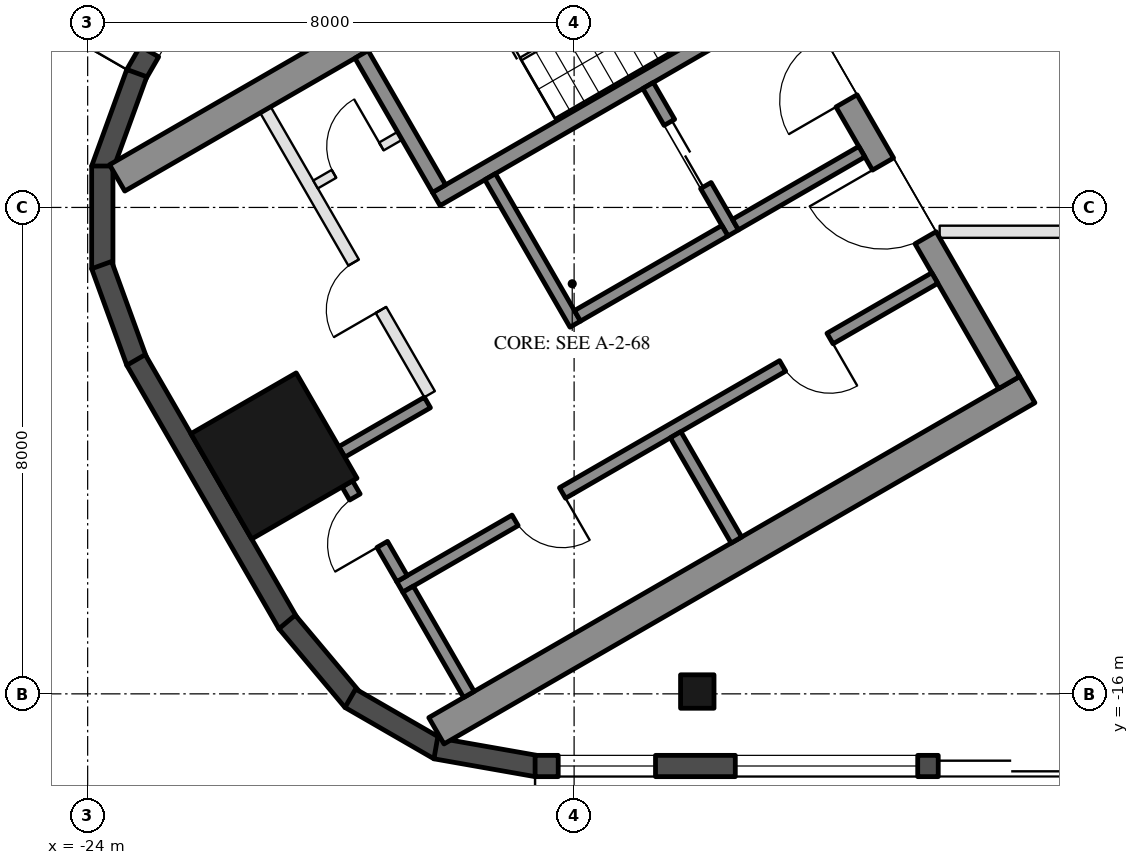
"""IFC4 building model, lengths in metres.
Left out: names, types, materials, properties, quantities, classifications, styles, units other than length and angle.
Written with IfcOpenShell. Run it as: python <this file> out.ifc"""

import sys

from ifc_helpers import new_model, si_unit, direction, frame, frame_2d, origin, origin_2d, place, context, subcontext, project, spatial, rectangle, hollow_rectangle, extrude, boolean, halfspace, element, fill, save


model = new_model("IFC4")
c1 = context("Model", 3, precision=1e-05, world=origin(), true_north=direction((0.0, 1.0)))
c2 = subcontext(c1, "Body", "Model", "MODEL_VIEW")
j1 = project(units=[si_unit("LENGTHUNIT", "METRE"), si_unit("PLANEANGLEUNIT", "RADIAN")], contexts=[c1])
p1 = place(None, origin())
s1 = spatial("IfcSite", under=j1, at=p1, CompositionType="ELEMENT")
p2 = place(p1, origin())
s2 = spatial("IfcBuilding", under=s1, at=p2, CompositionType="ELEMENT")
p3 = place(p2, frame((0.0, 0.0, 294.8)))
s3 = spatial("IfcBuildingStorey", under=s2, at=p3, CompositionType="ELEMENT", Elevation=294.8)
p4 = place(p3, frame((-13.974, -15.962, 0.0), z_axis=(0.0, 0.0, 1.0), x_axis=(-1.0, 0.0, 0.0)))
e1 = element("IfcColumn", 1, at=p4, inside=s3, PredefinedType="COLUMN", context=c2, shape_type="SweptSolid", body=[
    boolean("DIFFERENCE", extrude(hollow_rectangle(XDim=0.55, YDim=0.55, WallThickness=0.025, at=origin_2d()), origin(), (0.0, 0.0, 1.0), 3.7), halfspace(frame((0.0, 0.0, 3.66), z_axis=(0.0, 0.0, 1.0), x_axis=(1.0, 0.0, 0.0)), False)),
])
p5 = place(p3, frame((-20.936, -12.087, 0.0), z_axis=(0.0, 0.0, 1.0), x_axis=(-0.5, 0.866025403784, 0.0)))
e2 = element("IfcColumn", 2, at=p5, inside=s3, PredefinedType="COLUMN", context=c2, shape_type="SweptSolid", body=[
    boolean("DIFFERENCE", extrude(hollow_rectangle(XDim=2.0, YDim=2.0, WallThickness=0.05, at=origin_2d()), origin(), (0.0, 0.0, 1.0), 3.7), halfspace(frame((0.0, 0.0, 3.587), z_axis=(0.0, 0.0, 1.0), x_axis=(1.0, 0.0, 0.0)), False)),
])
p6 = place(p3, frame((-21.421, -2.729, 0.0), z_axis=(0.0, 0.0, 1.0), x_axis=(-0.500040399856, -0.86600207766, 0.0)))
e3 = element("IfcWall", 3, at=p6, inside=s3, PredefinedType="SOLIDWALL", context=c2, shape_type="SweptSolid", body=[
    extrude(rectangle(XDim=3.567, YDim=0.35, at=frame_2d((1.784, 0.0))), origin(), (0.0, 0.0, 1.0), 3.55),
])
p7 = place(p6, frame((1.525, 0.0, 0.3)))
e4 = element("IfcOpeningElement", 4, at=p7, cuts=e3, PredefinedType="OPENING", context=c2, shape_type="SweptSolid", body=[
    extrude(rectangle(XDim=1.6, YDim=2.65, at=frame_2d((0.8, 1.325))), frame((0.0, 0.185, 0.0), z_axis=(0.0, -1.0, 0.0), x_axis=(1.0, 0.0, 0.0)), (0.0, 0.0, 1.0), 0.37),
])
for number, where, z_axis, x_axis in (
    (5, (-23.192, -5.791, 0.0), (0.0, 0.0, 1.0), (-0.342, -0.94, 0.0)),
    (6, (-23.759, -7.319, 0.0), (0.0, 0.0, 1.0), (0.0, -1.0, 0.0)),
    (7, (-23.77, -8.948, 0.0), (0.0, 0.0, 1.0), (0.342, -0.94, 0.0)),
):
    element("IfcWall", number, at=place(p3, frame(where, z_axis=z_axis, x_axis=x_axis)), inside=s3, PredefinedType="SOLIDWALL", context=c2, shape_type="SweptSolid", body=[
        extrude(rectangle(XDim=1.689, YDim=0.35, at=frame_2d((0.845, 0.0))), origin(), (0.0, 0.0, 1.0), 3.55),
    ])
p8 = place(p3, frame((-23.205, -10.508, 0.0), z_axis=(0.0, 0.0, 1.0), x_axis=(0.500016662025, -0.866015783746, 0.0)))
e8 = element("IfcWall", 8, at=p8, inside=s3, PredefinedType="SOLIDWALL", context=c2, shape_type="SweptSolid", body=[
    extrude(rectangle(XDim=5.004, YDim=0.35, at=frame_2d((2.502, 0.0))), origin(), (0.0, 0.0, 1.0), 3.55),
])
p9 = place(p3, frame((-20.72, -14.817, 0.0), z_axis=(0.0, 0.0, 1.0), x_axis=(0.642697100627, -0.766120380127, 0.0)))
e9 = element("IfcWall", 9, at=p9, inside=s3, PredefinedType="SOLIDWALL", context=c2, shape_type="SweptSolid", body=[
    extrude(rectangle(XDim=1.689, YDim=0.35, at=frame_2d((0.845, 0.0))), origin(), (0.0, 0.0, 1.0), 3.55),
])
for number, where, z_axis, x_axis in (
    (10, (-19.681, -16.072, 0.0), (0.0, 0.0, 1.0), (0.866, -0.5, 0.0)),
    (11, (-18.275, -16.896, 0.0), (0.0, 0.0, 1.0), (0.985, -0.174, 0.0)),
):
    element("IfcWall", number, at=place(p3, frame(where, z_axis=z_axis, x_axis=x_axis)), inside=s3, PredefinedType="SOLIDWALL", context=c2, shape_type="SweptSolid", body=[
        extrude(rectangle(XDim=1.689, YDim=0.35, at=frame_2d((0.845, 0.0))), origin(), (0.0, 0.0, 1.0), 3.55),
    ])
p10 = place(p3, frame((-16.642, -17.187, 0.0), z_axis=(0.0, 0.0, 1.0), x_axis=(1.0, 0.0, 0.0)))
e12 = element("IfcWall", 12, at=p10, inside=s3, PredefinedType="SOLIDWALL", context=c2, shape_type="SweptSolid", body=[
    extrude(rectangle(XDim=10.554, YDim=0.35, at=frame_2d((5.277, 0.0))), origin(), (0.0, 0.0, 1.0), 3.55),
])
p11 = place(p10, frame((0.38, 0.0, 0.3)))
e13 = element("IfcOpeningElement", 13, at=p11, cuts=e12, PredefinedType="OPENING", context=c2, shape_type="SweptSolid", body=[
    extrude(rectangle(XDim=1.6, YDim=2.65, at=frame_2d((0.8, 1.325))), frame((0.0, 0.185, 0.0), z_axis=(0.0, -1.0, 0.0), x_axis=(1.0, 0.0, 0.0)), (0.0, 0.0, 1.0), 0.37),
])
p12 = place(p10, frame((6.63, 0.0, 0.0)))
e14 = element("IfcOpeningElement", 14, at=p12, cuts=e12, PredefinedType="OPENING", context=c2, shape_type="SweptSolid", body=[
    extrude(rectangle(XDim=2.4, YDim=2.4, at=frame_2d((1.2, 1.2))), frame((0.0, 0.185, 0.0), z_axis=(0.0, -1.0, 0.0), x_axis=(1.0, 0.0, 0.0)), (0.0, 0.0, 1.0), 0.37),
])
p13 = place(p10, frame((3.292, 0.0, 0.3)))
e15 = element("IfcOpeningElement", 15, at=p13, cuts=e12, PredefinedType="OPENING", context=c2, shape_type="SweptSolid", body=[
    extrude(rectangle(XDim=3.0, YDim=2.65, at=frame_2d((1.5, 1.325))), frame((0.0, 0.185, 0.0), z_axis=(0.0, -1.0, 0.0), x_axis=(1.0, 0.0, 0.0)), (0.0, 0.0, 1.0), 0.37),
])
for number, where, z_axis, x_axis in (
    (16, (-13.797, -1.903, 0.0), (0.0, 0.0, 1.0), (-0.866, -0.5, 0.0)),
    (17, (-8.547, -10.997, 0.0), (0.0, 0.0, 1.0), (-0.866, -0.5, 0.0)),
):
    element("IfcWall", number, at=place(p3, frame(where, z_axis=z_axis, x_axis=x_axis)), inside=s3, PredefinedType="SHEAR", context=c2, shape_type="SweptSolid", body=[
        extrude(rectangle(XDim=11.222, YDim=0.5, at=frame_2d((5.611, 0.0))), origin(), (0.0, 0.0, 1.0), 3.5),
    ])
p14 = place(p3, frame((-13.845, -2.22, 0.0), z_axis=(0.0, 0.0, 1.0), x_axis=(0.500004234368, -0.866022959057, 0.0)))
e18 = element("IfcWall", 18, at=p14, inside=s3, PredefinedType="SHEAR", context=c2, shape_type="SweptSolid", body=[
    extrude(rectangle(XDim=10.0, YDim=0.4, at=frame_2d((5.0, 0.0))), origin(), (0.0, 0.0, 1.0), 3.5),
])
p15 = place(p14, frame((3.55, 0.0, 0.0)))
e19 = element("IfcOpeningElement", 19, at=p15, cuts=e18, PredefinedType="OPENING", context=c2, shape_type="SweptSolid", body=[
    extrude(rectangle(XDim=1.1, YDim=2.1, at=frame_2d((0.55, 1.05))), frame((0.0, 0.21, 0.0), z_axis=(0.0, -1.0, 0.0), x_axis=(1.0, 0.0, 0.0)), (0.0, 0.0, 1.0), 0.42),
])
p16 = place(p14, frame((5.85, 0.0, 0.0)))
e20 = element("IfcOpeningElement", 20, at=p16, cuts=e18, PredefinedType="OPENING", context=c2, shape_type="SweptSolid", body=[
    extrude(rectangle(XDim=1.4, YDim=2.1, at=frame_2d((0.7, 1.05))), frame((0.0, 0.21, 0.0), z_axis=(0.0, -1.0, 0.0), x_axis=(1.0, 0.0, 0.0)), (0.0, 0.0, 1.0), 0.42),
])
p17 = place(p3, frame((-12.681, -4.636, 0.0), z_axis=(0.0, 0.0, 1.0), x_axis=(-0.866021702275, -0.500006411147, 0.0)))
e21 = element("IfcWall", 21, at=p17, inside=s3, PredefinedType="SHEAR", context=c2, shape_type="SweptSolid", body=[
    extrude(rectangle(XDim=6.45, YDim=0.25, at=frame_2d((3.225, 0.0))), origin(), (0.0, 0.0, 1.0), 3.5),
])
p18 = place(p17, frame((0.3, 0.0, 0.0)))
e22 = element("IfcOpeningElement", 22, at=p18, cuts=e21, PredefinedType="OPENING", context=c2, shape_type="SweptSolid", body=[
    extrude(rectangle(XDim=1.0, YDim=2.1, at=frame_2d((0.5, 1.05))), frame((0.0, 0.135, 0.0), z_axis=(0.0, -1.0, 0.0), x_axis=(1.0, 0.0, 0.0)), (0.0, 0.0, 1.0), 0.27),
])
p19 = place(p3, frame((-19.496, -5.482, 0.0), z_axis=(0.0, 0.0, 1.0), x_axis=(0.499990435942, -0.866030925526, 0.0)))
e23 = element("IfcWall", 23, at=p19, inside=s3, PredefinedType="SHEAR", context=c2, shape_type="SweptSolid", body=[
    extrude(rectangle(XDim=2.55, YDim=0.25, at=frame_2d((1.275, 0.0))), origin(), (0.0, 0.0, 1.0), 3.5),
])
p20 = place(p3, frame((-17.381, -7.495, 0.0), z_axis=(0.0, 0.0, 1.0), x_axis=(0.500011755427, -0.866018616679, 0.0)))
e24 = element("IfcWall", 24, at=p20, inside=s3, PredefinedType="SHEAR", context=c2, shape_type="SweptSolid", body=[
    extrude(rectangle(XDim=2.8, YDim=0.2, at=frame_2d((1.4, 0.0))), origin(), (0.0, 0.0, 1.0), 3.5),
])
p21 = place(p3, frame((-14.783, -5.995, 0.0), z_axis=(0.0, 0.0, 1.0), x_axis=(0.49994636267, -0.866056369097, 0.0)))
e25 = element("IfcWall", 25, at=p21, inside=s3, PredefinedType="SHEAR", context=c2, shape_type="SweptSolid", body=[
    extrude(rectangle(XDim=2.8, YDim=0.2, at=frame_2d((1.4, 0.0))), origin(), (0.0, 0.0, 1.0), 3.5),
])
p22 = place(p21, frame((0.7, 0.0, 0.0)))
e26 = element("IfcOpeningElement", 26, at=p22, cuts=e25, PredefinedType="OPENING", context=c2, shape_type="SweptSolid", body=[
    extrude(rectangle(XDim=1.2, YDim=2.1, at=frame_2d((0.6, 1.05))), frame((0.0, 0.11, 0.0), z_axis=(0.0, -1.0, 0.0), x_axis=(1.0, 0.0, 0.0)), (0.0, 0.0, 1.0), 0.22),
])
p23 = place(p3, frame((-13.52, -8.383, 0.0), z_axis=(0.0, 0.0, 1.0), x_axis=(-0.866034573852, -0.49998411664, 0.0)))
e27 = element("IfcWall", 27, at=p23, inside=s3, PredefinedType="SHEAR", context=c2, shape_type="SweptSolid", body=[
    extrude(rectangle(XDim=2.8, YDim=0.2, at=frame_2d((1.4, 0.0))), origin(), (0.0, 0.0, 1.0), 3.5),
])
p24 = place(p3, frame((-11.268, -7.083, 0.0), z_axis=(0.0, 0.0, 1.0), x_axis=(-0.866050077142, -0.499957262057, 0.0)))
e28 = element("IfcWall", 28, at=p24, inside=s3, PredefinedType="SHEAR", context=c2, shape_type="SweptSolid", body=[
    extrude(rectangle(XDim=2.4, YDim=0.2, at=frame_2d((1.2, 0.0))), origin(), (0.0, 0.0, 1.0), 3.5),
])
p25 = place(p3, frame((-10.068, -9.162, 0.0), z_axis=(0.0, 0.0, 1.0), x_axis=(-0.866032725843, -0.499987317609, 0.0)))
e29 = element("IfcWall", 29, at=p25, inside=s3, PredefinedType="SHEAR", context=c2, shape_type="SweptSolid", body=[
    extrude(rectangle(XDim=10.16, YDim=0.2, at=frame_2d((5.08, 0.0))), origin(), (0.0, 0.0, 1.0), 3.5),
])
p26 = place(p25, frame((1.99, 0.0, 0.0)))
e30 = element("IfcOpeningElement", 30, at=p26, cuts=e29, PredefinedType="OPENING", context=c2, shape_type="SweptSolid", body=[
    extrude(rectangle(XDim=0.9, YDim=2.1, at=frame_2d((0.45, 1.05))), frame((0.0, 0.11, 0.0), z_axis=(0.0, -1.0, 0.0), x_axis=(1.0, 0.0, 0.0)), (0.0, 0.0, 1.0), 0.22),
])
p27 = place(p25, frame((7.07, 0.0, 0.0)))
e31 = element("IfcOpeningElement", 31, at=p27, cuts=e29, PredefinedType="OPENING", context=c2, shape_type="SweptSolid", body=[
    extrude(rectangle(XDim=0.9, YDim=2.1, at=frame_2d((0.45, 1.05))), frame((0.0, 0.11, 0.0), z_axis=(0.0, -1.0, 0.0), x_axis=(1.0, 0.0, 0.0)), (0.0, 0.0, 1.0), 0.22),
])
p28 = place(p3, frame((-19.73, -12.546, 0.0), z_axis=(0.0, 0.0, 1.0), x_axis=(0.500004188491, -0.866022985545, 0.0)))
e32 = element("IfcWall", 32, at=p28, inside=s3, PredefinedType="SHEAR", context=c2, shape_type="SweptSolid", body=[
    extrude(rectangle(XDim=1.8, YDim=0.2, at=frame_2d((0.9, 0.0))), origin(), (0.0, 0.0, 1.0), 3.5),
])
p29 = place(p28, frame((0.25, 0.0, 0.0)))
e33 = element("IfcOpeningElement", 33, at=p29, cuts=e32, PredefinedType="OPENING", context=c2, shape_type="SweptSolid", body=[
    extrude(rectangle(XDim=0.9, YDim=2.1, at=frame_2d((0.45, 1.05))), frame((0.0, 0.11, 0.0), z_axis=(0.0, -1.0, 0.0), x_axis=(1.0, 0.0, 0.0)), (0.0, 0.0, 1.0), 0.22),
])
p30 = place(p3, frame((-18.413, -11.208, 0.0), z_axis=(0.0, 0.0, 1.0), x_axis=(-0.866053003207, -0.499952193351, 0.0)))
e34 = element("IfcWall", 34, at=p30, inside=s3, PredefinedType="SHEAR", context=c2, shape_type="SweptSolid", body=[
    extrude(rectangle(XDim=1.625, YDim=0.2, at=frame_2d((0.812, 0.0))), origin(), (0.0, 0.0, 1.0), 3.5),
])
for number, where, z_axis, x_axis in (
    (35, (-14.331, -11.738, 0.0), (0.0, 0.0, 1.0), (0.5, -0.866, 0.0)),
    (36, (-18.73, -14.278, 0.0), (0.0, 0.0, 1.0), (0.5, -0.866, 0.0)),
):
    element("IfcWall", number, at=place(p3, frame(where, z_axis=z_axis, x_axis=x_axis)), inside=s3, PredefinedType="SHEAR", context=c2, shape_type="SweptSolid", body=[
        extrude(rectangle(XDim=2.0, YDim=0.2, at=frame_2d((1.0, 0.0))), origin(), (0.0, 0.0, 1.0), 3.5),
    ])
p31 = place(p3, frame((-21.076, -6.395, 0.0), z_axis=(0.0, 0.0, 1.0), x_axis=(0.50001468107, -0.866016927499, 0.0)))
e37 = element("IfcWall", 37, at=p31, inside=s3, PredefinedType="PARTITIONING", context=c2, shape_type="SweptSolid", body=[
    extrude(rectangle(XDim=5.4, YDim=0.2, at=frame_2d((2.7, 0.0))), origin(), (0.0, 0.0, 1.0), 3.5),
])
p32 = place(p31, frame((2.9, 0.0, 0.0)))
e38 = element("IfcOpeningElement", 38, at=p32, cuts=e37, PredefinedType="OPENING", context=c2, shape_type="SweptSolid", body=[
    extrude(rectangle(XDim=0.9, YDim=2.1, at=frame_2d((0.45, 1.05))), frame((0.0, 0.11, 0.0), z_axis=(0.0, -1.0, 0.0), x_axis=(1.0, 0.0, 0.0)), (0.0, 0.0, 1.0), 0.22),
])
p33 = place(p3, frame((-18.866, -6.822, 0.0), z_axis=(0.0, 0.0, 1.0), x_axis=(-0.866028054938, -0.499995408039, 0.0)))
e39 = element("IfcWall", 39, at=p33, inside=s3, PredefinedType="PARTITIONING", context=c2, shape_type="SweptSolid", body=[
    extrude(rectangle(XDim=1.6, YDim=0.15, at=frame_2d((0.8, 0.0))), origin(), (0.0, 0.0, 1.0), 3.5),
])
p34 = place(p33, frame((0.35, 0.0, 0.0)))
e40 = element("IfcOpeningElement", 40, at=p34, cuts=e39, PredefinedType="OPENING", context=c2, shape_type="SweptSolid", body=[
    extrude(rectangle(XDim=0.9, YDim=2.1, at=frame_2d((0.45, 1.05))), frame((0.0, 0.085, 0.0), z_axis=(0.0, -1.0, 0.0), x_axis=(1.0, 0.0, 0.0)), (0.0, 0.0, 1.0), 0.17),
])
p35 = place(p3, frame((-3.588, -8.4, 0.0), z_axis=(0.0, 0.0, 1.0), x_axis=(-1.0, 0.0, 0.0)))
e41 = element("IfcWall", 41, at=p35, inside=s3, PredefinedType="PARTITIONING", context=c2, shape_type="SweptSolid", body=[
    extrude(rectangle(XDim=6.4, YDim=0.2, at=frame_2d((3.2, 0.0))), origin(), (0.0, 0.0, 1.0), 3.05),
])
p36 = place(p35, frame((2.957, 0.0, 0.0)))
e42 = element("IfcOpeningElement", 42, at=p36, cuts=e41, PredefinedType="OPENING", context=c2, shape_type="SweptSolid", body=[
    extrude(rectangle(XDim=1.0, YDim=2.1, at=frame_2d((0.5, 1.05))), frame((0.0, 0.11, 0.0), z_axis=(0.0, -1.0, 0.0), x_axis=(1.0, 0.0, 0.0)), (0.0, 0.0, 1.0), 0.22),
])
p37 = place(p11, origin())
e43 = element("IfcWindow", 43, at=p37, inside=s3, PartitioningType="SINGLE_PANEL", PredefinedType="WINDOW", context=c2, shape_type="SweptSolid", body=[
    extrude(rectangle(XDim=1.6, YDim=2.65, at=frame_2d((0.8, 1.325))), frame((0.0, 0.03, 0.0), z_axis=(0.0, -1.0, 0.0), x_axis=(1.0, 0.0, 0.0)), (0.0, 0.0, 1.0), 0.06),
])
fill(e13, e43)
p38 = place(p12, frame((2.4, 0.0, 0.0), z_axis=(0.0, 0.0, 1.0), x_axis=(-1.0, 0.0, 0.0)))
e44 = element("IfcDoor", 44, at=p38, inside=s3, OperationType="SLIDING_TO_LEFT", PredefinedType="DOOR", context=c2, shape_type="SweptSolid", body=[
    extrude(rectangle(XDim=2.4, YDim=2.4, at=frame_2d((1.2, 1.2))), frame((0.0, 0.025, 0.0), z_axis=(0.0, -1.0, 0.0), x_axis=(1.0, 0.0, 0.0)), (0.0, 0.0, 1.0), 0.05),
])
fill(e14, e44)
p39 = place(p13, origin())
e45 = element("IfcWindow", 45, at=p39, inside=s3, PartitioningType="SINGLE_PANEL", PredefinedType="WINDOW", context=c2, shape_type="SweptSolid", body=[
    extrude(rectangle(XDim=3.0, YDim=2.65, at=frame_2d((1.5, 1.325))), frame((0.0, 0.03, 0.0), z_axis=(0.0, -1.0, 0.0), x_axis=(1.0, 0.0, 0.0)), (0.0, 0.0, 1.0), 0.06),
])
fill(e15, e45)
p40 = place(p7, origin())
e46 = element("IfcWindow", 46, at=p40, inside=s3, PartitioningType="SINGLE_PANEL", PredefinedType="WINDOW", context=c2, shape_type="SweptSolid", body=[
    extrude(rectangle(XDim=1.6, YDim=2.65, at=frame_2d((0.8, 1.325))), frame((0.0, 0.03, 0.0), z_axis=(0.0, -1.0, 0.0), x_axis=(1.0, 0.0, 0.0)), (0.0, 0.0, 1.0), 0.06),
])
fill(e4, e46)
p41 = place(p22, origin())
e47 = element("IfcDoor", 47, at=p41, inside=s3, OperationType="DOUBLE_DOOR_SLIDING", PredefinedType="DOOR", context=c2, shape_type="SweptSolid", body=[
    extrude(rectangle(XDim=1.2, YDim=2.1, at=frame_2d((0.6, 1.05))), frame((0.0, 0.025, 0.0), z_axis=(0.0, -1.0, 0.0), x_axis=(1.0, 0.0, 0.0)), (0.0, 0.0, 1.0), 0.05),
])
fill(e26, e47)
p42 = place(p34, frame((0.9, 0.0, 0.0), z_axis=(0.0, 0.0, 1.0), x_axis=(-1.0, 0.0, 0.0)))
e48 = element("IfcDoor", 48, at=p42, inside=s3, OperationType="SINGLE_SWING_RIGHT", PredefinedType="DOOR", context=c2, shape_type="SweptSolid", body=[
    extrude(rectangle(XDim=0.9, YDim=2.1, at=frame_2d((0.45, 1.05))), frame((0.0, 0.025, 0.0), z_axis=(0.0, -1.0, 0.0), x_axis=(1.0, 0.0, 0.0)), (0.0, 0.0, 1.0), 0.05),
])
fill(e40, e48)
p43 = place(p26, origin())
e49 = element("IfcDoor", 49, at=p43, inside=s3, OperationType="SINGLE_SWING_LEFT", PredefinedType="DOOR", context=c2, shape_type="SweptSolid", body=[
    extrude(rectangle(XDim=0.9, YDim=2.1, at=frame_2d((0.45, 1.05))), frame((0.0, 0.025, 0.0), z_axis=(0.0, -1.0, 0.0), x_axis=(1.0, 0.0, 0.0)), (0.0, 0.0, 1.0), 0.05),
])
fill(e30, e49)
p44 = place(p27, origin())
e50 = element("IfcDoor", 50, at=p44, inside=s3, OperationType="SINGLE_SWING_LEFT", PredefinedType="DOOR", context=c2, shape_type="SweptSolid", body=[
    extrude(rectangle(XDim=0.9, YDim=2.1, at=frame_2d((0.45, 1.05))), frame((0.0, 0.025, 0.0), z_axis=(0.0, -1.0, 0.0), x_axis=(1.0, 0.0, 0.0)), (0.0, 0.0, 1.0), 0.05),
])
fill(e31, e50)
p45 = place(p29, frame((0.9, 0.0, 0.0), z_axis=(0.0, 0.0, 1.0), x_axis=(-1.0, 0.0, 0.0)))
e51 = element("IfcDoor", 51, at=p45, inside=s3, OperationType="SINGLE_SWING_LEFT", PredefinedType="DOOR", context=c2, shape_type="SweptSolid", body=[
    extrude(rectangle(XDim=0.9, YDim=2.1, at=frame_2d((0.45, 1.05))), frame((0.0, 0.025, 0.0), z_axis=(0.0, -1.0, 0.0), x_axis=(1.0, 0.0, 0.0)), (0.0, 0.0, 1.0), 0.05),
])
fill(e33, e51)
p46 = place(p32, frame((0.9, 0.0, 0.0), z_axis=(0.0, 0.0, 1.0), x_axis=(-1.0, 0.0, 0.0)))
e52 = element("IfcDoor", 52, at=p46, inside=s3, OperationType="SINGLE_SWING_LEFT", PredefinedType="DOOR", context=c2, shape_type="SweptSolid", body=[
    extrude(rectangle(XDim=0.9, YDim=2.1, at=frame_2d((0.45, 1.05))), frame((0.0, 0.025, 0.0), z_axis=(0.0, -1.0, 0.0), x_axis=(1.0, 0.0, 0.0)), (0.0, 0.0, 1.0), 0.05),
])
fill(e38, e52)
p47 = place(p15, frame((1.1, 0.0, 0.0), z_axis=(0.0, 0.0, 1.0), x_axis=(-1.0, 0.0, 0.0)))
e53 = element("IfcDoor", 53, at=p47, inside=s3, OperationType="SINGLE_SWING_LEFT", PredefinedType="DOOR", context=c2, shape_type="SweptSolid", body=[
    extrude(rectangle(XDim=1.1, YDim=2.1, at=frame_2d((0.55, 1.05))), frame((0.0, 0.025, 0.0), z_axis=(0.0, -1.0, 0.0), x_axis=(1.0, 0.0, 0.0)), (0.0, 0.0, 1.0), 0.05),
])
fill(e19, e53)
p48 = place(p16, frame((1.4, 0.0, 0.0), z_axis=(0.0, 0.0, 1.0), x_axis=(-1.0, 0.0, 0.0)))
e54 = element("IfcDoor", 54, at=p48, inside=s3, OperationType="DOUBLE_DOOR_SINGLE_SWING", PredefinedType="DOOR", context=c2, shape_type="SweptSolid", body=[
    extrude(rectangle(XDim=1.4, YDim=2.1, at=frame_2d((0.7, 1.05))), frame((0.0, 0.025, 0.0), z_axis=(0.0, -1.0, 0.0), x_axis=(1.0, 0.0, 0.0)), (0.0, 0.0, 1.0), 0.05),
])
fill(e20, e54)
save(model, sys.argv[1])
